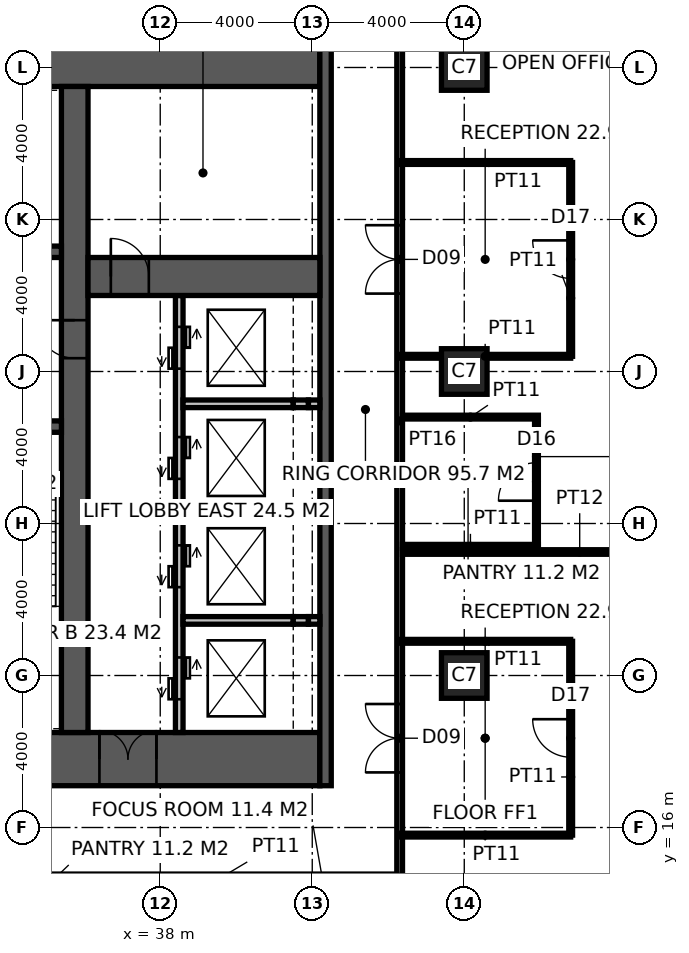
"""IFC4 building model, lengths in metres.
Left out: names, types, materials, properties, quantities, classifications, styles, units other than length and angle.
Written with IfcOpenShell. Run it as: python <this file> out.ifc"""

import sys

from ifc_helpers import new_model, si_unit, direction, frame, frame_2d, origin, origin_2d, place, context, subcontext, project, spatial, rectangle, hollow_rectangle, extrude, element, fill, save


model = new_model("IFC4")
c1 = context("Model", 3, precision=1e-05, world=origin(), true_north=direction((0.0, 1.0)))
c2 = subcontext(c1, "Body", "Model", "MODEL_VIEW")
j1 = project(units=[si_unit("LENGTHUNIT", "METRE"), si_unit("PLANEANGLEUNIT", "RADIAN")], contexts=[c1])
p1 = place(None, origin())
s1 = spatial("IfcSite", under=j1, at=p1, CompositionType="ELEMENT")
p2 = place(p1, origin())
s2 = spatial("IfcBuilding", under=s1, at=p2, CompositionType="ELEMENT")
p3 = place(p2, frame((0.0, 0.0, 59.0)))
s3 = spatial("IfcBuildingStorey", under=s2, at=p3, CompositionType="ELEMENT", Elevation=59.0)
for number, where, z_axis, x_axis in (
    (1, (46.0, 20.0, 0.0), (0.0, 0.0, 1.0), (1.0, 0.0, 0.0)),
    (2, (46.0, 28.0, 0.0), (0.0, 0.0, 1.0), (1.0, 0.0, 0.0)),
    (3, (46.0, 36.0, 0.0), (0.0, 0.0, 1.0), (1.0, 0.0, 0.0)),
):
    element("IfcColumn", number, at=place(p3, frame(where, z_axis=z_axis, x_axis=x_axis)), inside=s3, PredefinedType="COLUMN", context=c2, shape_type="SweptSolid", body=[
        extrude(hollow_rectangle(XDim=1.2, YDim=1.2, WallThickness=0.1, at=origin_2d()), origin(), (0.0, 0.0, 1.0), 4.0),
    ])
p4 = place(p3, frame((18.5, 17.8, -0.15), z_axis=(0.0, 0.0, 1.0), x_axis=(1.0, 0.0, 0.0)))
e4 = element("IfcWall", 4, at=p4, inside=s3, PredefinedType="SHEAR", context=c2, shape_type="SweptSolid", body=[
    extrude(rectangle(XDim=23.7, YDim=1.4, at=frame_2d((11.85, 0.0))), origin(), (0.0, 0.0, 1.0), 4.0),
])
p5 = place(p4, frame((3.45, 0.0, 0.15)))
e5 = element("IfcOpeningElement", 5, at=p5, cuts=e4, PredefinedType="OPENING", context=c2, shape_type="SweptSolid", body=[
    extrude(rectangle(XDim=1.5, YDim=2.4, at=frame_2d((0.75, 1.2))), frame((0.0, 0.71, 0.0), z_axis=(0.0, -1.0, 0.0), x_axis=(1.0, 0.0, 0.0)), (0.0, 0.0, 1.0), 1.42),
])
p6 = place(p4, frame((17.9, 0.0, 0.15)))
e6 = element("IfcOpeningElement", 6, at=p6, cuts=e4, PredefinedType="OPENING", context=c2, shape_type="SweptSolid", body=[
    extrude(rectangle(XDim=1.5, YDim=2.4, at=frame_2d((0.75, 1.2))), frame((0.0, 0.71, 0.0), z_axis=(0.0, -1.0, 0.0), x_axis=(1.0, 0.0, 0.0)), (0.0, 0.0, 1.0), 1.42),
])
p7 = place(p4, frame((0.9, 0.0, 0.15)))
e7 = element("IfcOpeningElement", 7, at=p7, cuts=e4, PredefinedType="OPENING", context=c2, shape_type="SweptSolid", body=[
    extrude(rectangle(XDim=1.0, YDim=2.2, at=frame_2d((0.5, 1.1))), frame((0.0, 0.71, 0.0), z_axis=(0.0, -1.0, 0.0), x_axis=(1.0, 0.0, 0.0)), (0.0, 0.0, 1.0), 1.42),
])
p8 = place(p3, frame((18.5, 36.2, -0.15), z_axis=(0.0, 0.0, 1.0), x_axis=(1.0, 0.0, 0.0)))
e8 = element("IfcWall", 8, at=p8, inside=s3, PredefinedType="SHEAR", context=c2, shape_type="SweptSolid", body=[
    extrude(rectangle(XDim=23.7, YDim=1.4, at=frame_2d((11.85, 0.0))), origin(), (0.0, 0.0, 1.0), 4.0),
])
p9 = place(p3, frame((42.35, 17.1, -0.15), z_axis=(0.0, 0.0, 1.0), x_axis=(0.0, 1.0, 0.0)))
e9 = element("IfcWall", 9, at=p9, inside=s3, PredefinedType="SHEAR", context=c2, shape_type="SweptSolid", body=[
    extrude(rectangle(XDim=19.8, YDim=0.3, at=frame_2d((9.9, 0.0))), origin(), (0.0, 0.0, 1.0), 4.0),
])
p10 = place(p3, frame((35.75, 18.5, -0.15), z_axis=(0.0, 0.0, 1.0), x_axis=(0.0, 1.0, 0.0)))
e10 = element("IfcWall", 10, at=p10, inside=s3, PredefinedType="SHEAR", context=c2, shape_type="SweptSolid", body=[
    extrude(rectangle(XDim=17.0, YDim=0.7, at=frame_2d((8.5, 0.0))), origin(), (0.0, 0.0, 1.0), 4.0),
])
p11 = place(p10, frame((9.85, 0.0, 0.15)))
e11 = element("IfcOpeningElement", 11, at=p11, cuts=e10, PredefinedType="OPENING", context=c2, shape_type="SweptSolid", body=[
    extrude(rectangle(XDim=1.0, YDim=2.2, at=frame_2d((0.5, 1.1))), frame((0.0, 0.36, 0.0), z_axis=(0.0, -1.0, 0.0), x_axis=(1.0, 0.0, 0.0)), (0.0, 0.0, 1.0), 0.72),
])
p12 = place(p3, frame((24.15, 26.55, -0.15), z_axis=(0.0, 0.0, 1.0), x_axis=(1.0, 0.0, 0.0)))
e12 = element("IfcWall", 12, at=p12, inside=s3, PredefinedType="SHEAR", context=c2, shape_type="SweptSolid", body=[
    extrude(rectangle(XDim=11.25, YDim=0.3, at=frame_2d((5.625, 0.0))), origin(), (0.0, 0.0, 1.0), 4.0),
])
p13 = place(p12, frame((9.25, 0.0, 0.15)))
e13 = element("IfcOpeningElement", 13, at=p13, cuts=e12, PredefinedType="OPENING", context=c2, shape_type="SweptSolid", body=[
    extrude(rectangle(XDim=1.0, YDim=2.2, at=frame_2d((0.5, 1.1))), frame((0.0, 0.16, 0.0), z_axis=(0.0, -1.0, 0.0), x_axis=(1.0, 0.0, 0.0)), (0.0, 0.0, 1.0), 0.32),
])
p14 = place(p12, frame((4.9, 0.0, 0.15)))
e14 = element("IfcOpeningElement", 14, at=p14, cuts=e12, PredefinedType="OPENING", context=c2, shape_type="SweptSolid", body=[
    extrude(rectangle(XDim=1.5, YDim=2.4, at=frame_2d((0.75, 1.2))), frame((0.0, 0.16, 0.0), z_axis=(0.0, -1.0, 0.0), x_axis=(1.0, 0.0, 0.0)), (0.0, 0.0, 1.0), 0.32),
])
p15 = place(p3, frame((24.15, 31.15, -0.15), z_axis=(0.0, 0.0, 1.0), x_axis=(1.0, 0.0, 0.0)))
e15 = element("IfcWall", 15, at=p15, inside=s3, PredefinedType="SHEAR", context=c2, shape_type="SweptSolid", body=[
    extrude(rectangle(XDim=11.25, YDim=0.3, at=frame_2d((5.625, 0.0))), origin(), (0.0, 0.0, 1.0), 4.0),
])
p16 = place(p15, frame((7.25, 0.0, 0.15)))
e16 = element("IfcOpeningElement", 16, at=p16, cuts=e15, PredefinedType="OPENING", context=c2, shape_type="SweptSolid", body=[
    extrude(rectangle(XDim=1.4, YDim=2.4, at=frame_2d((0.7, 1.2))), frame((0.0, 0.16, 0.0), z_axis=(0.0, -1.0, 0.0), x_axis=(1.0, 0.0, 0.0)), (0.0, 0.0, 1.0), 0.32),
])
p17 = place(p3, frame((38.5, 18.5, -0.15), z_axis=(0.0, 0.0, 1.0), x_axis=(0.0, 1.0, 0.0)))
e17 = element("IfcWall", 17, at=p17, inside=s3, PredefinedType="SOLIDWALL", context=c2, shape_type="SweptSolid", body=[
    extrude(rectangle(XDim=11.5, YDim=0.2, at=frame_2d((5.75, 0.0))), origin(), (0.0, 0.0, 1.0), 4.0),
])
p18 = place(p17, frame((0.875, 0.0, 0.15)))
e18 = element("IfcOpeningElement", 18, at=p18, cuts=e17, PredefinedType="OPENING", context=c2, shape_type="SweptSolid", body=[
    extrude(rectangle(XDim=1.1, YDim=2.2, at=frame_2d((0.55, 1.1))), frame((0.0, 0.11, 0.0), z_axis=(0.0, -1.0, 0.0), x_axis=(1.0, 0.0, 0.0)), (0.0, 0.0, 1.0), 0.22),
])
p19 = place(p17, frame((3.825, 0.0, 0.15)))
e19 = element("IfcOpeningElement", 19, at=p19, cuts=e17, PredefinedType="OPENING", context=c2, shape_type="SweptSolid", body=[
    extrude(rectangle(XDim=1.1, YDim=2.2, at=frame_2d((0.55, 1.1))), frame((0.0, 0.11, 0.0), z_axis=(0.0, -1.0, 0.0), x_axis=(1.0, 0.0, 0.0)), (0.0, 0.0, 1.0), 0.22),
])
p20 = place(p17, frame((6.675, 0.0, 0.15)))
e20 = element("IfcOpeningElement", 20, at=p20, cuts=e17, PredefinedType="OPENING", context=c2, shape_type="SweptSolid", body=[
    extrude(rectangle(XDim=1.1, YDim=2.2, at=frame_2d((0.55, 1.1))), frame((0.0, 0.11, 0.0), z_axis=(0.0, -1.0, 0.0), x_axis=(1.0, 0.0, 0.0)), (0.0, 0.0, 1.0), 0.22),
])
p21 = place(p17, frame((9.575, 0.0, 0.15)))
e21 = element("IfcOpeningElement", 21, at=p21, cuts=e17, PredefinedType="OPENING", context=c2, shape_type="SweptSolid", body=[
    extrude(rectangle(XDim=1.1, YDim=2.2, at=frame_2d((0.55, 1.1))), frame((0.0, 0.11, 0.0), z_axis=(0.0, -1.0, 0.0), x_axis=(1.0, 0.0, 0.0)), (0.0, 0.0, 1.0), 0.22),
])
p22 = place(p3, frame((36.1, 30.5, -0.15), z_axis=(0.0, 0.0, 1.0), x_axis=(1.0, 0.0, 0.0)))
e22 = element("IfcWall", 22, at=p22, inside=s3, PredefinedType="SHEAR", context=c2, shape_type="SweptSolid", body=[
    extrude(rectangle(XDim=6.1, YDim=1.0, at=frame_2d((3.05, 0.0))), origin(), (0.0, 0.0, 1.0), 4.0),
])
p23 = place(p22, frame((0.6, 0.0, 0.15)))
e23 = element("IfcOpeningElement", 23, at=p23, cuts=e22, PredefinedType="OPENING", context=c2, shape_type="SweptSolid", body=[
    extrude(rectangle(XDim=1.0, YDim=2.2, at=frame_2d((0.5, 1.1))), frame((0.0, 0.51, 0.0), z_axis=(0.0, -1.0, 0.0), x_axis=(1.0, 0.0, 0.0)), (0.0, 0.0, 1.0), 1.02),
])
p24 = place(p3, frame((38.6, 21.45, -0.15), z_axis=(0.0, 0.0, 1.0), x_axis=(1.0, 0.0, 0.0)))
e24 = element("IfcWall", 24, at=p24, inside=s3, PredefinedType="SOLIDWALL", context=c2, shape_type="SweptSolid", body=[
    extrude(rectangle(XDim=2.9, YDim=0.2, at=frame_2d((1.45, 0.0))), origin(), (0.0, 0.0, 1.0), 4.0),
])
p25 = place(p3, frame((41.5, 21.45, -0.15), z_axis=(0.0, 0.0, 1.0), x_axis=(1.0, 0.0, 0.0)))
e25 = element("IfcWall", 25, at=p25, inside=s3, PredefinedType="SOLIDWALL", context=c2, shape_type="SweptSolid", body=[
    extrude(rectangle(XDim=0.4, YDim=0.2, at=frame_2d((0.2, 0.0))), origin(), (0.0, 0.0, 1.0), 4.0),
])
p26 = place(p3, frame((41.9, 21.45, -0.15), z_axis=(0.0, 0.0, 1.0), x_axis=(1.0, 0.0, 0.0)))
e26 = element("IfcWall", 26, at=p26, inside=s3, PredefinedType="SOLIDWALL", context=c2, shape_type="SweptSolid", body=[
    extrude(rectangle(XDim=0.3, YDim=0.2, at=frame_2d((0.15, 0.0))), origin(), (0.0, 0.0, 1.0), 4.0),
])
p27 = place(p3, frame((38.6, 24.3, -0.15), z_axis=(0.0, 0.0, 1.0), x_axis=(1.0, 0.0, 0.0)))
e27 = element("IfcWall", 27, at=p27, inside=s3, PredefinedType="SOLIDWALL", context=c2, shape_type="SweptSolid", body=[
    extrude(rectangle(XDim=2.9, YDim=0.2, at=frame_2d((1.45, 0.0))), origin(), (0.0, 0.0, 1.0), 4.0),
])
p28 = place(p3, frame((41.5, 24.3, -0.15), z_axis=(0.0, 0.0, 1.0), x_axis=(1.0, 0.0, 0.0)))
e28 = element("IfcWall", 28, at=p28, inside=s3, PredefinedType="SOLIDWALL", context=c2, shape_type="SweptSolid", body=[
    extrude(rectangle(XDim=0.4, YDim=0.2, at=frame_2d((0.2, 0.0))), origin(), (0.0, 0.0, 1.0), 4.0),
])
p29 = place(p3, frame((41.9, 24.3, -0.15), z_axis=(0.0, 0.0, 1.0), x_axis=(1.0, 0.0, 0.0)))
e29 = element("IfcWall", 29, at=p29, inside=s3, PredefinedType="SOLIDWALL", context=c2, shape_type="SweptSolid", body=[
    extrude(rectangle(XDim=0.3, YDim=0.2, at=frame_2d((0.15, 0.0))), origin(), (0.0, 0.0, 1.0), 4.0),
])
p30 = place(p3, frame((38.6, 27.15, -0.15), z_axis=(0.0, 0.0, 1.0), x_axis=(1.0, 0.0, 0.0)))
e30 = element("IfcWall", 30, at=p30, inside=s3, PredefinedType="SOLIDWALL", context=c2, shape_type="SweptSolid", body=[
    extrude(rectangle(XDim=2.9, YDim=0.2, at=frame_2d((1.45, 0.0))), origin(), (0.0, 0.0, 1.0), 4.0),
])
p31 = place(p3, frame((41.5, 27.15, -0.15), z_axis=(0.0, 0.0, 1.0), x_axis=(1.0, 0.0, 0.0)))
e31 = element("IfcWall", 31, at=p31, inside=s3, PredefinedType="SOLIDWALL", context=c2, shape_type="SweptSolid", body=[
    extrude(rectangle(XDim=0.4, YDim=0.2, at=frame_2d((0.2, 0.0))), origin(), (0.0, 0.0, 1.0), 4.0),
])
p32 = place(p3, frame((41.9, 27.15, -0.15), z_axis=(0.0, 0.0, 1.0), x_axis=(1.0, 0.0, 0.0)))
e32 = element("IfcWall", 32, at=p32, inside=s3, PredefinedType="SOLIDWALL", context=c2, shape_type="SweptSolid", body=[
    extrude(rectangle(XDim=0.3, YDim=0.2, at=frame_2d((0.15, 0.0))), origin(), (0.0, 0.0, 1.0), 4.0),
])
p33 = place(p3, frame((44.3, 14.625, 0.0), z_axis=(0.0, 0.0, 1.0), x_axis=(0.0, 1.0, 0.0)))
e33 = element("IfcWall", 33, at=p33, inside=s3, PredefinedType="PARTITIONING", context=c2, shape_type="SweptSolid", body=[
    extrude(rectangle(XDim=24.15, YDim=0.15, at=frame_2d((12.075, 0.0))), origin(), (0.0, 0.0, 1.0), 3.85),
])
p34 = place(p33, frame((2.825, 0.0, 0.0)))
e34 = element("IfcOpeningElement", 34, at=p34, cuts=e33, PredefinedType="OPENING", context=c2, shape_type="SweptSolid", body=[
    extrude(rectangle(XDim=1.8, YDim=2.4, at=frame_2d((0.9, 1.2))), frame((0.0, 0.085, 0.0), z_axis=(0.0, -1.0, 0.0), x_axis=(1.0, 0.0, 0.0)), (0.0, 0.0, 1.0), 0.17),
])
p35 = place(p33, frame((15.425, 0.0, 0.0)))
e35 = element("IfcOpeningElement", 35, at=p35, cuts=e33, PredefinedType="OPENING", context=c2, shape_type="SweptSolid", body=[
    extrude(rectangle(XDim=1.8, YDim=2.4, at=frame_2d((0.9, 1.2))), frame((0.0, 0.085, 0.0), z_axis=(0.0, -1.0, 0.0), x_axis=(1.0, 0.0, 0.0)), (0.0, 0.0, 1.0), 0.17),
])
p36 = place(p3, frame((44.375, 23.25, 0.0), z_axis=(0.0, 0.0, 1.0), x_axis=(1.0, 0.0, 0.0)))
e36 = element("IfcWall", 36, at=p36, inside=s3, PredefinedType="PARTITIONING", context=c2, shape_type="SweptSolid", body=[
    extrude(rectangle(XDim=9.325, YDim=0.12, at=frame_2d((4.663, 0.0))), origin(), (0.0, 0.0, 1.0), 3.85),
])
for number, where, z_axis, x_axis in (
    (37, (44.375, 23.4, 0.0), (0.0, 0.0, 1.0), (1.0, 0.0, 0.0)),
    (38, (44.375, 26.8, 0.0), (0.0, 0.0, 1.0), (1.0, 0.0, 0.0)),
):
    element("IfcWall", number, at=place(p3, frame(where, z_axis=z_axis, x_axis=x_axis)), inside=s3, PredefinedType="PARTITIONING", context=c2, shape_type="SweptSolid", body=[
        extrude(rectangle(XDim=3.575, YDim=0.1, at=frame_2d((1.788, 0.0))), origin(), (0.0, 0.0, 1.0), 3.85),
    ])
p37 = place(p3, frame((47.9, 23.45, 0.0), z_axis=(0.0, 0.0, 1.0), x_axis=(0.0, 1.0, 0.0)))
e39 = element("IfcWall", 39, at=p37, inside=s3, PredefinedType="PARTITIONING", context=c2, shape_type="SweptSolid", body=[
    extrude(rectangle(XDim=3.3, YDim=0.1, at=frame_2d((1.65, 0.0))), origin(), (0.0, 0.0, 1.0), 3.85),
])
p38 = place(p37, frame((1.15, 0.0, 0.0)))
e40 = element("IfcOpeningElement", 40, at=p38, cuts=e39, PredefinedType="OPENING", context=c2, shape_type="SweptSolid", body=[
    extrude(rectangle(XDim=1.0, YDim=2.2, at=frame_2d((0.5, 1.1))), frame((0.0, 0.06, 0.0), z_axis=(0.0, -1.0, 0.0), x_axis=(1.0, 0.0, 0.0)), (0.0, 0.0, 1.0), 0.12),
])
p39 = place(p3, frame((44.3, 15.8, 0.0), z_axis=(0.0, 0.0, 1.0), x_axis=(1.0, 0.0, 0.0)))
e41 = element("IfcWall", 41, at=p39, inside=s3, PredefinedType="PARTITIONING", context=c2, shape_type="SweptSolid", body=[
    extrude(rectangle(XDim=4.5, YDim=0.1, at=frame_2d((2.25, 0.0))), origin(), (0.0, 0.0, 1.0), 3.85),
])
p40 = place(p3, frame((48.8, 15.8, 0.0), z_axis=(0.0, 0.0, 1.0), x_axis=(0.0, 1.0, 0.0)))
e42 = element("IfcWall", 42, at=p40, inside=s3, PredefinedType="PARTITIONING", context=c2, shape_type="SweptSolid", body=[
    extrude(rectangle(XDim=5.1, YDim=0.1, at=frame_2d((2.55, 0.0))), origin(), (0.0, 0.0, 1.0), 3.85),
])
p41 = place(p40, frame((2.05, 0.0, 0.0)))
e43 = element("IfcOpeningElement", 43, at=p41, cuts=e42, PredefinedType="OPENING", context=c2, shape_type="SweptSolid", body=[
    extrude(rectangle(XDim=1.0, YDim=2.2, at=frame_2d((0.5, 1.1))), frame((0.0, 0.06, 0.0), z_axis=(0.0, -1.0, 0.0), x_axis=(1.0, 0.0, 0.0)), (0.0, 0.0, 1.0), 0.12),
])
p42 = place(p3, frame((48.8, 20.9, 0.0), z_axis=(0.0, 0.0, 1.0), x_axis=(-1.0, 0.0, 0.0)))
e44 = element("IfcWall", 44, at=p42, inside=s3, PredefinedType="PARTITIONING", context=c2, shape_type="SweptSolid", body=[
    extrude(rectangle(XDim=4.5, YDim=0.1, at=frame_2d((2.25, 0.0))), origin(), (0.0, 0.0, 1.0), 3.85),
])
p43 = place(p3, frame((44.3, 28.4, 0.0), z_axis=(0.0, 0.0, 1.0), x_axis=(1.0, 0.0, 0.0)))
e45 = element("IfcWall", 45, at=p43, inside=s3, PredefinedType="PARTITIONING", context=c2, shape_type="SweptSolid", body=[
    extrude(rectangle(XDim=4.5, YDim=0.1, at=frame_2d((2.25, 0.0))), origin(), (0.0, 0.0, 1.0), 2.95),
])
p44 = place(p3, frame((48.8, 28.4, 0.0), z_axis=(0.0, 0.0, 1.0), x_axis=(0.0, 1.0, 0.0)))
e46 = element("IfcWall", 46, at=p44, inside=s3, PredefinedType="PARTITIONING", context=c2, shape_type="SweptSolid", body=[
    extrude(rectangle(XDim=5.1, YDim=0.1, at=frame_2d((2.55, 0.0))), origin(), (0.0, 0.0, 1.0), 3.85),
])
p45 = place(p44, frame((2.05, 0.0, 0.0)))
e47 = element("IfcOpeningElement", 47, at=p45, cuts=e46, PredefinedType="OPENING", context=c2, shape_type="SweptSolid", body=[
    extrude(rectangle(XDim=1.0, YDim=2.2, at=frame_2d((0.5, 1.1))), frame((0.0, 0.06, 0.0), z_axis=(0.0, -1.0, 0.0), x_axis=(1.0, 0.0, 0.0)), (0.0, 0.0, 1.0), 0.12),
])
p46 = place(p3, frame((48.8, 33.5, 0.0), z_axis=(0.0, 0.0, 1.0), x_axis=(-1.0, 0.0, 0.0)))
e48 = element("IfcWall", 48, at=p46, inside=s3, PredefinedType="PARTITIONING", context=c2, shape_type="SweptSolid", body=[
    extrude(rectangle(XDim=4.5, YDim=0.1, at=frame_2d((2.25, 0.0))), origin(), (0.0, 0.0, 1.0), 3.85),
])
p47 = place(p11, origin())
e49 = element("IfcDoor", 49, at=p47, inside=s3, OperationType="SINGLE_SWING_RIGHT", PredefinedType="DOOR", context=c2, shape_type="SweptSolid", body=[
    extrude(rectangle(XDim=1.0, YDim=2.2, at=frame_2d((0.5, 1.1))), frame((0.0, 0.025, 0.0), z_axis=(0.0, -1.0, 0.0), x_axis=(1.0, 0.0, 0.0)), (0.0, 0.0, 1.0), 0.05),
])
fill(e11, e49)
p48 = place(p6, origin())
e50 = element("IfcDoor", 50, at=p48, inside=s3, OperationType="DOUBLE_DOOR_DOUBLE_SWING", PredefinedType="DOOR", context=c2, shape_type="SweptSolid", body=[
    extrude(rectangle(XDim=1.5, YDim=2.4, at=frame_2d((0.75, 1.2))), frame((0.0, 0.025, 0.0), z_axis=(0.0, -1.0, 0.0), x_axis=(1.0, 0.0, 0.0)), (0.0, 0.0, 1.0), 0.05),
])
fill(e6, e50)
p49 = place(p23, origin())
e51 = element("IfcDoor", 51, at=p49, inside=s3, OperationType="SINGLE_SWING_LEFT", PredefinedType="DOOR", context=c2, shape_type="SweptSolid", body=[
    extrude(rectangle(XDim=1.0, YDim=2.2, at=frame_2d((0.5, 1.1))), frame((0.0, 0.025, 0.0), z_axis=(0.0, -1.0, 0.0), x_axis=(1.0, 0.0, 0.0)), (0.0, 0.0, 1.0), 0.05),
])
fill(e23, e51)
p50 = place(p34, origin())
e52 = element("IfcDoor", 52, at=p50, inside=s3, OperationType="DOUBLE_DOOR_DOUBLE_SWING", PredefinedType="DOOR", context=c2, shape_type="SweptSolid", body=[
    extrude(rectangle(XDim=1.8, YDim=2.4, at=frame_2d((0.9, 1.2))), frame((0.0, 0.025, 0.0), z_axis=(0.0, -1.0, 0.0), x_axis=(1.0, 0.0, 0.0)), (0.0, 0.0, 1.0), 0.05),
])
fill(e34, e52)
p51 = place(p35, origin())
e53 = element("IfcDoor", 53, at=p51, inside=s3, OperationType="DOUBLE_DOOR_DOUBLE_SWING", PredefinedType="DOOR", context=c2, shape_type="SweptSolid", body=[
    extrude(rectangle(XDim=1.8, YDim=2.4, at=frame_2d((0.9, 1.2))), frame((0.0, 0.025, 0.0), z_axis=(0.0, -1.0, 0.0), x_axis=(1.0, 0.0, 0.0)), (0.0, 0.0, 1.0), 0.05),
])
fill(e35, e53)
p52 = place(p38, origin())
e54 = element("IfcDoor", 54, at=p52, inside=s3, OperationType="SINGLE_SWING_LEFT", PredefinedType="DOOR", context=c2, shape_type="SweptSolid", body=[
    extrude(rectangle(XDim=1.0, YDim=2.2, at=frame_2d((0.5, 1.1))), frame((0.0, 0.025, 0.0), z_axis=(0.0, -1.0, 0.0), x_axis=(1.0, 0.0, 0.0)), (0.0, 0.0, 1.0), 0.05),
])
fill(e40, e54)
p53 = place(p41, origin())
e55 = element("IfcDoor", 55, at=p53, inside=s3, OperationType="SINGLE_SWING_RIGHT", PredefinedType="DOOR", context=c2, shape_type="SweptSolid", body=[
    extrude(rectangle(XDim=1.0, YDim=2.2, at=frame_2d((0.5, 1.1))), frame((0.0, 0.025, 0.0), z_axis=(0.0, -1.0, 0.0), x_axis=(1.0, 0.0, 0.0)), (0.0, 0.0, 1.0), 0.05),
])
fill(e43, e55)
p54 = place(p45, origin())
e56 = element("IfcDoor", 56, at=p54, inside=s3, OperationType="SINGLE_SWING_RIGHT", PredefinedType="DOOR", context=c2, shape_type="SweptSolid", body=[
    extrude(rectangle(XDim=1.0, YDim=2.2, at=frame_2d((0.5, 1.1))), frame((0.0, 0.025, 0.0), z_axis=(0.0, -1.0, 0.0), x_axis=(1.0, 0.0, 0.0)), (0.0, 0.0, 1.0), 0.05),
])
fill(e47, e56)
p55 = place(p18, origin())
e57 = element("IfcDoor", 57, at=p55, inside=s3, OperationType="DOUBLE_DOOR_SLIDING", PredefinedType="DOOR", context=c2, shape_type="SweptSolid", body=[
    extrude(rectangle(XDim=1.1, YDim=2.2, at=frame_2d((0.55, 1.1))), frame((0.0, 0.025, 0.0), z_axis=(0.0, -1.0, 0.0), x_axis=(1.0, 0.0, 0.0)), (0.0, 0.0, 1.0), 0.05),
])
fill(e18, e57)
p56 = place(p19, origin())
e58 = element("IfcDoor", 58, at=p56, inside=s3, OperationType="DOUBLE_DOOR_SLIDING", PredefinedType="DOOR", context=c2, shape_type="SweptSolid", body=[
    extrude(rectangle(XDim=1.1, YDim=2.2, at=frame_2d((0.55, 1.1))), frame((0.0, 0.025, 0.0), z_axis=(0.0, -1.0, 0.0), x_axis=(1.0, 0.0, 0.0)), (0.0, 0.0, 1.0), 0.05),
])
fill(e19, e58)
p57 = place(p20, origin())
e59 = element("IfcDoor", 59, at=p57, inside=s3, OperationType="DOUBLE_DOOR_SLIDING", PredefinedType="DOOR", context=c2, shape_type="SweptSolid", body=[
    extrude(rectangle(XDim=1.1, YDim=2.2, at=frame_2d((0.55, 1.1))), frame((0.0, 0.025, 0.0), z_axis=(0.0, -1.0, 0.0), x_axis=(1.0, 0.0, 0.0)), (0.0, 0.0, 1.0), 0.05),
])
fill(e20, e59)
p58 = place(p21, origin())
e60 = element("IfcDoor", 60, at=p58, inside=s3, OperationType="DOUBLE_DOOR_SLIDING", PredefinedType="DOOR", context=c2, shape_type="SweptSolid", body=[
    extrude(rectangle(XDim=1.1, YDim=2.2, at=frame_2d((0.55, 1.1))), frame((0.0, 0.025, 0.0), z_axis=(0.0, -1.0, 0.0), x_axis=(1.0, 0.0, 0.0)), (0.0, 0.0, 1.0), 0.05),
])
fill(e21, e60)
save(model, sys.argv[1])
